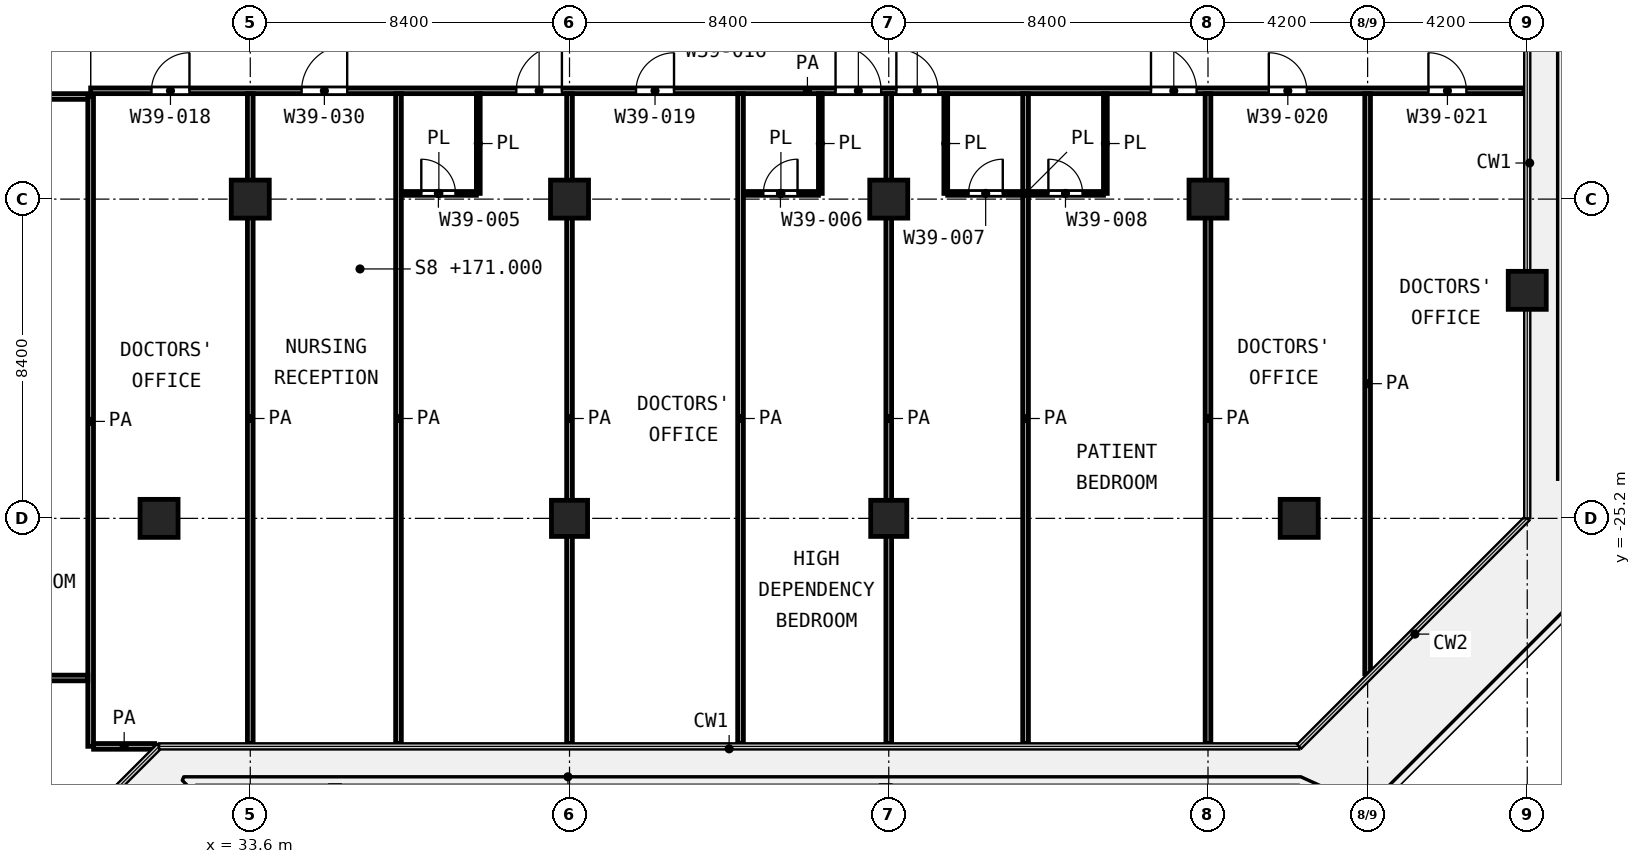
"""IFC4 building model, lengths in metres.
Left out: names, types, materials, properties, quantities, classifications, styles, units other than length and angle.
Written with IfcOpenShell. Run it as: python <this file> out.ifc"""

import sys

from ifc_helpers import new_model, si_unit, direction, frame, frame_2d, origin, origin_2d, place, context, subcontext, project, spatial, rectangle, extrude, element, fill, save


model = new_model("IFC4")
c1 = context("Model", 3, precision=1e-05, world=origin(), true_north=direction((0.0, 1.0)))
c2 = subcontext(c1, "Body", "Model", "MODEL_VIEW")
j1 = project(units=[si_unit("LENGTHUNIT", "METRE"), si_unit("PLANEANGLEUNIT", "RADIAN")], contexts=[c1])
p1 = place(None, origin())
s1 = spatial("IfcSite", under=j1, at=p1, CompositionType="ELEMENT")
p2 = place(p1, origin())
s2 = spatial("IfcBuilding", under=s1, at=p2, CompositionType="ELEMENT")
p3 = place(p2, frame((0.0, 0.0, 171.0)))
s3 = spatial("IfcBuildingStorey", under=s2, at=p3, CompositionType="ELEMENT", Elevation=171.0)
for number, where, z_axis, x_axis in (
    (1, (33.6, -16.8, 0.0), (0.0, 0.0, 1.0), (1.0, 0.0, 0.0)),
    (2, (42.0, -16.8, 0.0), (0.0, 0.0, 1.0), (1.0, 0.0, 0.0)),
    (3, (50.4, -16.8, 0.0), (0.0, 0.0, 1.0), (1.0, 0.0, 0.0)),
    (4, (58.8, -16.8, 0.0), (0.0, 0.0, 1.0), (1.0, 0.0, 0.0)),
    (5, (67.2, -19.2, 0.0), (0.0, 0.0, 1.0), (1.0, 0.0, 0.0)),
    (6, (31.2, -25.2, 0.0), (0.0, 0.0, 1.0), (1.0, 0.0, 0.0)),
):
    element("IfcColumn", number, at=place(p3, frame(where, z_axis=z_axis, x_axis=x_axis)), inside=s3, PredefinedType="COLUMN", context=c2, shape_type="SweptSolid", body=[
        extrude(rectangle(XDim=1.0, YDim=1.0, at=origin_2d()), origin(), (0.0, 0.0, 1.0), 4.2),
    ])
for number, where, z_axis, x_axis in (
    (7, (42.0, -25.2, 0.0), (0.0, 0.0, 1.0), (1.0, 0.0, 0.0)),
    (8, (50.4, -25.2, 0.0), (0.0, 0.0, 1.0), (1.0, 0.0, 0.0)),
):
    element("IfcColumn", number, at=place(p3, frame(where, z_axis=z_axis, x_axis=x_axis)), inside=s3, PredefinedType="COLUMN", context=c2, shape_type="SweptSolid", body=[
        extrude(rectangle(XDim=0.95, YDim=0.95, at=origin_2d()), origin(), (0.0, 0.0, 1.0), 4.2),
    ])
p4 = place(p3, frame((61.2, -25.2, 0.0), z_axis=(0.0, 0.0, 1.0), x_axis=(1.0, 0.0, 0.0)))
e9 = element("IfcColumn", 9, at=p4, inside=s3, PredefinedType="COLUMN", context=c2, shape_type="SweptSolid", body=[
    extrude(rectangle(XDim=1.0, YDim=1.0, at=origin_2d()), origin(), (0.0, 0.0, 1.0), 4.2),
])
p5 = place(p3, frame((37.575, -16.65, 0.0), z_axis=(0.0, 0.0, 1.0), x_axis=(1.0, 0.0, 0.0)))
e10 = element("IfcWall", 10, at=p5, inside=s3, PredefinedType="PARTITIONING", context=c2, shape_type="SweptSolid", body=[
    extrude(rectangle(XDim=1.975, YDim=0.1, at=frame_2d((0.988, 0.0))), origin(), (0.0, 0.0, 1.0), 3.6),
])
p6 = place(p5, frame((0.525, 0.0, 0.0)))
e11 = element("IfcOpeningElement", 11, at=p6, cuts=e10, PredefinedType="OPENING", context=c2, shape_type="SweptSolid", body=[
    extrude(rectangle(XDim=0.9, YDim=2.1, at=frame_2d((0.45, 1.05))), frame((0.0, 0.06, 0.0), z_axis=(0.0, -1.0, 0.0), x_axis=(1.0, 0.0, 0.0)), (0.0, 0.0, 1.0), 0.12),
])
p7 = place(p3, frame((46.575, -16.65, 0.0), z_axis=(0.0, 0.0, 1.0), x_axis=(1.0, 0.0, 0.0)))
e12 = element("IfcWall", 12, at=p7, inside=s3, PredefinedType="PARTITIONING", context=c2, shape_type="SweptSolid", body=[
    extrude(rectangle(XDim=1.975, YDim=0.1, at=frame_2d((0.988, 0.0))), origin(), (0.0, 0.0, 1.0), 3.6),
])
p8 = place(p7, frame((0.525, 0.0, 0.0)))
e13 = element("IfcOpeningElement", 13, at=p8, cuts=e12, PredefinedType="OPENING", context=c2, shape_type="SweptSolid", body=[
    extrude(rectangle(XDim=0.9, YDim=2.1, at=frame_2d((0.45, 1.05))), frame((0.0, 0.06, 0.0), z_axis=(0.0, -1.0, 0.0), x_axis=(1.0, 0.0, 0.0)), (0.0, 0.0, 1.0), 0.12),
])
p9 = place(p3, frame((51.95, -16.65, 0.0), z_axis=(0.0, 0.0, 1.0), x_axis=(1.0, 0.0, 0.0)))
e14 = element("IfcWall", 14, at=p9, inside=s3, PredefinedType="PARTITIONING", context=c2, shape_type="SweptSolid", body=[
    extrude(rectangle(XDim=4.1, YDim=0.1, at=frame_2d((2.05, 0.0))), origin(), (0.0, 0.0, 1.0), 3.6),
])
p10 = place(p9, frame((0.55, 0.0, 0.0)))
e15 = element("IfcOpeningElement", 15, at=p10, cuts=e14, PredefinedType="OPENING", context=c2, shape_type="SweptSolid", body=[
    extrude(rectangle(XDim=0.9, YDim=2.1, at=frame_2d((0.45, 1.05))), frame((0.0, 0.06, 0.0), z_axis=(0.0, -1.0, 0.0), x_axis=(1.0, 0.0, 0.0)), (0.0, 0.0, 1.0), 0.12),
])
p11 = place(p9, frame((2.65, 0.0, 0.0)))
e16 = element("IfcOpeningElement", 16, at=p11, cuts=e14, PredefinedType="OPENING", context=c2, shape_type="SweptSolid", body=[
    extrude(rectangle(XDim=0.9, YDim=2.1, at=frame_2d((0.45, 1.05))), frame((0.0, 0.06, 0.0), z_axis=(0.0, -1.0, 0.0), x_axis=(1.0, 0.0, 0.0)), (0.0, 0.0, 1.0), 0.12),
])
for number, where, z_axis, x_axis in (
    (17, (39.6, -16.65, 0.0), (0.0, 0.0, 1.0), (0.0, 1.0, 0.0)),
    (18, (48.6, -16.65, 0.0), (0.0, 0.0, 1.0), (0.0, 1.0, 0.0)),
    (19, (51.9, -16.65, 0.0), (0.0, 0.0, 1.0), (0.0, 1.0, 0.0)),
    (20, (56.1, -16.65, 0.0), (0.0, 0.0, 1.0), (0.0, 1.0, 0.0)),
):
    element("IfcWall", number, at=place(p3, frame(where, z_axis=z_axis, x_axis=x_axis)), inside=s3, PredefinedType="PARTITIONING", context=c2, shape_type="SweptSolid", body=[
        extrude(rectangle(XDim=2.625, YDim=0.1, at=frame_2d((1.312, 0.0))), origin(), (0.0, 0.0, 1.0), 3.6),
    ])
p12 = place(p3, frame((29.477, -31.2, 0.0), z_axis=(0.0, 0.0, 1.0), x_axis=(1.0, 0.0, 0.0)))
e21 = element("IfcWall", 21, at=p12, inside=s3, PredefinedType="PARTITIONING", context=c2, shape_type="SweptSolid", body=[
    extrude(rectangle(XDim=1.61, YDim=0.15, at=frame_2d((0.805, 0.0))), origin(), (0.0, 0.0, 1.0), 3.6),
])
p13 = place(p3, frame((14.175, -29.4, 0.0), z_axis=(0.0, 0.0, 1.0), x_axis=(1.0, 0.0, 0.0)))
e22 = element("IfcWall", 22, at=p13, inside=s3, PredefinedType="PARTITIONING", context=c2, shape_type="SweptSolid", body=[
    extrude(rectangle(XDim=15.15, YDim=0.15, at=frame_2d((7.575, 0.0))), origin(), (0.0, 0.0, 1.0), 3.6),
])
p14 = place(p3, frame((24.9, -14.1, 0.0), z_axis=(0.0, 0.0, 1.0), x_axis=(1.0, 0.0, 0.0)))
e23 = element("IfcWall", 23, at=p14, inside=s3, PredefinedType="PARTITIONING", context=c2, shape_type="SweptSolid", body=[
    extrude(rectangle(XDim=4.425, YDim=0.15, at=frame_2d((2.212, 0.0))), origin(), (0.0, 0.0, 1.0), 3.6),
])
p15 = place(p14, frame((1.65, 0.0, 0.0)))
e24 = element("IfcOpeningElement", 24, at=p15, cuts=e23, PredefinedType="OPENING", context=c2, shape_type="SweptSolid", body=[
    extrude(rectangle(XDim=1.5, YDim=2.1, at=frame_2d((0.75, 1.05))), frame((0.0, 0.085, 0.0), z_axis=(0.0, -1.0, 0.0), x_axis=(1.0, 0.0, 0.0)), (0.0, 0.0, 1.0), 0.17),
])
p16 = place(p3, frame((29.4, -13.95, 0.0), z_axis=(0.0, 0.0, 1.0), x_axis=(1.0, 0.0, 0.0)))
e25 = element("IfcWall", 25, at=p16, inside=s3, PredefinedType="PARTITIONING", context=c2, shape_type="SweptSolid", body=[
    extrude(rectangle(XDim=37.72, YDim=0.15, at=frame_2d((18.86, 0.0))), origin(), (0.0, 0.0, 1.0), 3.6),
])
p17 = place(p16, frame((1.6, 0.0, 0.0)))
e26 = element("IfcOpeningElement", 26, at=p17, cuts=e25, PredefinedType="OPENING", context=c2, shape_type="SweptSolid", body=[
    extrude(rectangle(XDim=1.0, YDim=2.1, at=frame_2d((0.5, 1.05))), frame((0.0, 0.085, 0.0), z_axis=(0.0, -1.0, 0.0), x_axis=(1.0, 0.0, 0.0)), (0.0, 0.0, 1.0), 0.17),
])
p18 = place(p16, frame((5.55, 0.0, 0.0)))
e27 = element("IfcOpeningElement", 27, at=p18, cuts=e25, PredefinedType="OPENING", context=c2, shape_type="SweptSolid", body=[
    extrude(rectangle(XDim=1.2, YDim=2.1, at=frame_2d((0.6, 1.05))), frame((0.0, 0.085, 0.0), z_axis=(0.0, -1.0, 0.0), x_axis=(1.0, 0.0, 0.0)), (0.0, 0.0, 1.0), 0.17),
])
p19 = place(p16, frame((11.2, 0.0, 0.0)))
e28 = element("IfcOpeningElement", 28, at=p19, cuts=e25, PredefinedType="OPENING", context=c2, shape_type="SweptSolid", body=[
    extrude(rectangle(XDim=1.2, YDim=2.1, at=frame_2d((0.6, 1.05))), frame((0.0, 0.085, 0.0), z_axis=(0.0, -1.0, 0.0), x_axis=(1.0, 0.0, 0.0)), (0.0, 0.0, 1.0), 0.17),
])
p20 = place(p16, frame((14.35, 0.0, 0.0)))
e29 = element("IfcOpeningElement", 29, at=p20, cuts=e25, PredefinedType="OPENING", context=c2, shape_type="SweptSolid", body=[
    extrude(rectangle(XDim=1.0, YDim=2.1, at=frame_2d((0.5, 1.05))), frame((0.0, 0.085, 0.0), z_axis=(0.0, -1.0, 0.0), x_axis=(1.0, 0.0, 0.0)), (0.0, 0.0, 1.0), 0.17),
])
p21 = place(p16, frame((19.6, 0.0, 0.0)))
e30 = element("IfcOpeningElement", 30, at=p21, cuts=e25, PredefinedType="OPENING", context=c2, shape_type="SweptSolid", body=[
    extrude(rectangle(XDim=1.2, YDim=2.1, at=frame_2d((0.6, 1.05))), frame((0.0, 0.085, 0.0), z_axis=(0.0, -1.0, 0.0), x_axis=(1.0, 0.0, 0.0)), (0.0, 0.0, 1.0), 0.17),
])
p22 = place(p16, frame((21.2, 0.0, 0.0)))
e31 = element("IfcOpeningElement", 31, at=p22, cuts=e25, PredefinedType="OPENING", context=c2, shape_type="SweptSolid", body=[
    extrude(rectangle(XDim=1.1, YDim=2.1, at=frame_2d((0.55, 1.05))), frame((0.0, 0.085, 0.0), z_axis=(0.0, -1.0, 0.0), x_axis=(1.0, 0.0, 0.0)), (0.0, 0.0, 1.0), 0.17),
])
p23 = place(p16, frame((27.9, 0.0, 0.0)))
e32 = element("IfcOpeningElement", 32, at=p23, cuts=e25, PredefinedType="OPENING", context=c2, shape_type="SweptSolid", body=[
    extrude(rectangle(XDim=1.2, YDim=2.1, at=frame_2d((0.6, 1.05))), frame((0.0, 0.085, 0.0), z_axis=(0.0, -1.0, 0.0), x_axis=(1.0, 0.0, 0.0)), (0.0, 0.0, 1.0), 0.17),
])
p24 = place(p16, frame((31.0, 0.0, 0.0)))
e33 = element("IfcOpeningElement", 33, at=p24, cuts=e25, PredefinedType="OPENING", context=c2, shape_type="SweptSolid", body=[
    extrude(rectangle(XDim=1.0, YDim=2.1, at=frame_2d((0.5, 1.05))), frame((0.0, 0.085, 0.0), z_axis=(0.0, -1.0, 0.0), x_axis=(1.0, 0.0, 0.0)), (0.0, 0.0, 1.0), 0.17),
])
p25 = place(p16, frame((35.2, 0.0, 0.0)))
e34 = element("IfcOpeningElement", 34, at=p25, cuts=e25, PredefinedType="OPENING", context=c2, shape_type="SweptSolid", body=[
    extrude(rectangle(XDim=1.0, YDim=2.1, at=frame_2d((0.5, 1.05))), frame((0.0, 0.085, 0.0), z_axis=(0.0, -1.0, 0.0), x_axis=(1.0, 0.0, 0.0)), (0.0, 0.0, 1.0), 0.17),
])
p26 = place(p3, frame((29.4, -31.198, 0.0), z_axis=(0.0, 0.0, 1.0), x_axis=(0.0, 1.0, 0.0)))
e35 = element("IfcWall", 35, at=p26, inside=s3, PredefinedType="PARTITIONING", context=c2, shape_type="SweptSolid", body=[
    extrude(rectangle(XDim=17.098, YDim=0.15, at=frame_2d((8.549, 0.0))), origin(), (0.0, 0.0, 1.0), 3.6),
])
for number, where, z_axis, x_axis in (
    (36, (33.6, -31.12, 0.0), (0.0, 0.0, 1.0), (0.0, 1.0, 0.0)),
    (37, (37.5, -31.12, 0.0), (0.0, 0.0, 1.0), (0.0, 1.0, 0.0)),
    (38, (42.0, -31.12, 0.0), (0.0, 0.0, 1.0), (0.0, 1.0, 0.0)),
    (39, (46.5, -31.12, 0.0), (0.0, 0.0, 1.0), (0.0, 1.0, 0.0)),
    (40, (50.4, -31.12, 0.0), (0.0, 0.0, 1.0), (0.0, 1.0, 0.0)),
    (41, (54.0, -31.12, 0.0), (0.0, 0.0, 1.0), (0.0, 1.0, 0.0)),
    (42, (58.8, -31.12, 0.0), (0.0, 0.0, 1.0), (0.0, 1.0, 0.0)),
):
    element("IfcWall", number, at=place(p3, frame(where, z_axis=z_axis, x_axis=x_axis)), inside=s3, PredefinedType="PARTITIONING", context=c2, shape_type="SweptSolid", body=[
        extrude(rectangle(XDim=17.095, YDim=0.15, at=frame_2d((8.548, 0.0))), origin(), (0.0, 0.0, 1.0), 3.6),
    ])
p27 = place(p3, frame((63.0, -29.287, 0.0), z_axis=(0.0, 0.0, 1.0), x_axis=(0.0, 1.0, 0.0)))
e43 = element("IfcWall", 43, at=p27, inside=s3, PredefinedType="PARTITIONING", context=c2, shape_type="SweptSolid", body=[
    extrude(rectangle(XDim=15.262, YDim=0.15, at=frame_2d((7.631, 0.0))), origin(), (0.0, 0.0, 1.0), 3.6),
])
p28 = place(p17, origin())
e44 = element("IfcDoor", 44, at=p28, inside=s3, OperationType="SINGLE_SWING_RIGHT", PredefinedType="DOOR", context=c2, shape_type="SweptSolid", body=[
    extrude(rectangle(XDim=1.0, YDim=2.1, at=frame_2d((0.5, 1.05))), frame((0.0, 0.025, 0.0), z_axis=(0.0, -1.0, 0.0), x_axis=(1.0, 0.0, 0.0)), (0.0, 0.0, 1.0), 0.05),
])
fill(e26, e44)
p29 = place(p18, origin())
e45 = element("IfcDoor", 45, at=p29, inside=s3, OperationType="SINGLE_SWING_RIGHT", PredefinedType="DOOR", context=c2, shape_type="SweptSolid", body=[
    extrude(rectangle(XDim=1.2, YDim=2.1, at=frame_2d((0.6, 1.05))), frame((0.0, 0.025, 0.0), z_axis=(0.0, -1.0, 0.0), x_axis=(1.0, 0.0, 0.0)), (0.0, 0.0, 1.0), 0.05),
])
fill(e27, e45)
p30 = place(p19, origin())
e46 = element("IfcDoor", 46, at=p30, inside=s3, OperationType="SINGLE_SWING_RIGHT", PredefinedType="DOOR", context=c2, shape_type="SweptSolid", body=[
    extrude(rectangle(XDim=1.2, YDim=2.1, at=frame_2d((0.6, 1.05))), frame((0.0, 0.025, 0.0), z_axis=(0.0, -1.0, 0.0), x_axis=(1.0, 0.0, 0.0)), (0.0, 0.0, 1.0), 0.05),
])
fill(e28, e46)
p31 = place(p6, origin())
e47 = element("IfcDoor", 47, at=p31, inside=s3, OperationType="SINGLE_SWING_LEFT", PredefinedType="DOOR", context=c2, shape_type="SweptSolid", body=[
    extrude(rectangle(XDim=0.9, YDim=2.1, at=frame_2d((0.45, 1.05))), frame((0.0, 0.025, 0.0), z_axis=(0.0, -1.0, 0.0), x_axis=(1.0, 0.0, 0.0)), (0.0, 0.0, 1.0), 0.05),
])
fill(e11, e47)
p32 = place(p20, origin())
e48 = element("IfcDoor", 48, at=p32, inside=s3, OperationType="SINGLE_SWING_RIGHT", PredefinedType="DOOR", context=c2, shape_type="SweptSolid", body=[
    extrude(rectangle(XDim=1.0, YDim=2.1, at=frame_2d((0.5, 1.05))), frame((0.0, 0.025, 0.0), z_axis=(0.0, -1.0, 0.0), x_axis=(1.0, 0.0, 0.0)), (0.0, 0.0, 1.0), 0.05),
])
fill(e29, e48)
p33 = place(p21, origin())
e49 = element("IfcDoor", 49, at=p33, inside=s3, OperationType="SINGLE_SWING_LEFT", PredefinedType="DOOR", context=c2, shape_type="SweptSolid", body=[
    extrude(rectangle(XDim=1.2, YDim=2.1, at=frame_2d((0.6, 1.05))), frame((0.0, 0.025, 0.0), z_axis=(0.0, -1.0, 0.0), x_axis=(1.0, 0.0, 0.0)), (0.0, 0.0, 1.0), 0.05),
])
fill(e30, e49)
p34 = place(p8, origin())
e50 = element("IfcDoor", 50, at=p34, inside=s3, OperationType="SINGLE_SWING_RIGHT", PredefinedType="DOOR", context=c2, shape_type="SweptSolid", body=[
    extrude(rectangle(XDim=0.9, YDim=2.1, at=frame_2d((0.45, 1.05))), frame((0.0, 0.025, 0.0), z_axis=(0.0, -1.0, 0.0), x_axis=(1.0, 0.0, 0.0)), (0.0, 0.0, 1.0), 0.05),
])
fill(e13, e50)
p35 = place(p22, origin())
e51 = element("IfcDoor", 51, at=p35, inside=s3, OperationType="SINGLE_SWING_LEFT", PredefinedType="DOOR", context=c2, shape_type="SweptSolid", body=[
    extrude(rectangle(XDim=1.1, YDim=2.1, at=frame_2d((0.55, 1.05))), frame((0.0, 0.025, 0.0), z_axis=(0.0, -1.0, 0.0), x_axis=(1.0, 0.0, 0.0)), (0.0, 0.0, 1.0), 0.05),
])
fill(e31, e51)
p36 = place(p10, origin())
e52 = element("IfcDoor", 52, at=p36, inside=s3, OperationType="SINGLE_SWING_RIGHT", PredefinedType="DOOR", context=c2, shape_type="SweptSolid", body=[
    extrude(rectangle(XDim=0.9, YDim=2.1, at=frame_2d((0.45, 1.05))), frame((0.0, 0.025, 0.0), z_axis=(0.0, -1.0, 0.0), x_axis=(1.0, 0.0, 0.0)), (0.0, 0.0, 1.0), 0.05),
])
fill(e15, e52)
p37 = place(p23, origin())
e53 = element("IfcDoor", 53, at=p37, inside=s3, OperationType="SINGLE_SWING_LEFT", PredefinedType="DOOR", context=c2, shape_type="SweptSolid", body=[
    extrude(rectangle(XDim=1.2, YDim=2.1, at=frame_2d((0.6, 1.05))), frame((0.0, 0.025, 0.0), z_axis=(0.0, -1.0, 0.0), x_axis=(1.0, 0.0, 0.0)), (0.0, 0.0, 1.0), 0.05),
])
fill(e32, e53)
p38 = place(p11, origin())
e54 = element("IfcDoor", 54, at=p38, inside=s3, OperationType="SINGLE_SWING_LEFT", PredefinedType="DOOR", context=c2, shape_type="SweptSolid", body=[
    extrude(rectangle(XDim=0.9, YDim=2.1, at=frame_2d((0.45, 1.05))), frame((0.0, 0.025, 0.0), z_axis=(0.0, -1.0, 0.0), x_axis=(1.0, 0.0, 0.0)), (0.0, 0.0, 1.0), 0.05),
])
fill(e16, e54)
p39 = place(p24, origin())
e55 = element("IfcDoor", 55, at=p39, inside=s3, OperationType="SINGLE_SWING_LEFT", PredefinedType="DOOR", context=c2, shape_type="SweptSolid", body=[
    extrude(rectangle(XDim=1.0, YDim=2.1, at=frame_2d((0.5, 1.05))), frame((0.0, 0.025, 0.0), z_axis=(0.0, -1.0, 0.0), x_axis=(1.0, 0.0, 0.0)), (0.0, 0.0, 1.0), 0.05),
])
fill(e33, e55)
p40 = place(p25, origin())
e56 = element("IfcDoor", 56, at=p40, inside=s3, OperationType="SINGLE_SWING_LEFT", PredefinedType="DOOR", context=c2, shape_type="SweptSolid", body=[
    extrude(rectangle(XDim=1.0, YDim=2.1, at=frame_2d((0.5, 1.05))), frame((0.0, 0.025, 0.0), z_axis=(0.0, -1.0, 0.0), x_axis=(1.0, 0.0, 0.0)), (0.0, 0.0, 1.0), 0.05),
])
fill(e34, e56)
save(model, sys.argv[1])
